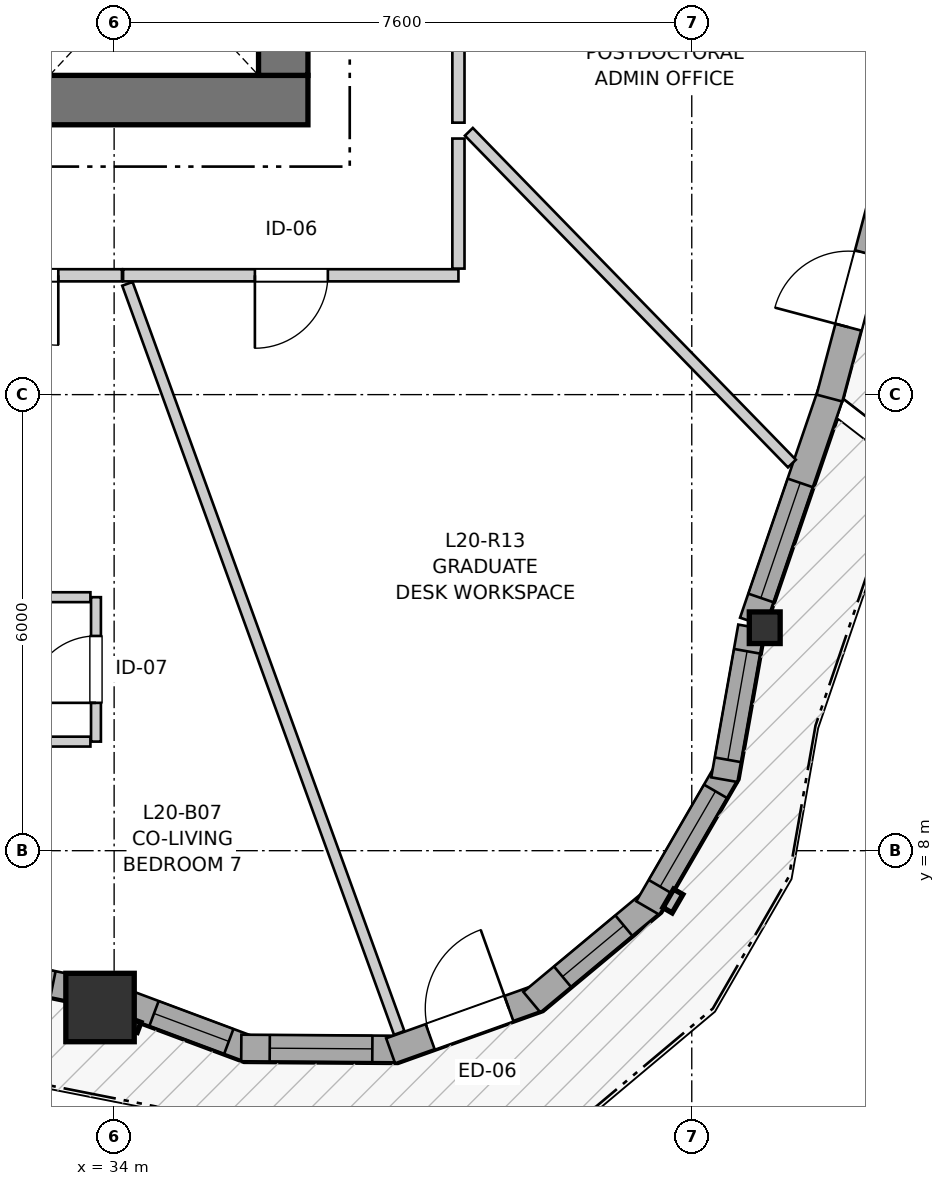
"""IFC4 building model, lengths in metres.
Left out: names, types, materials, properties, quantities, classifications, styles, units other than length and angle.
Written with IfcOpenShell. Run it as: python <this file> out.ifc"""

import sys

from ifc_helpers import new_model, si_unit, direction, frame, frame_2d, origin, origin_2d, place, context, subcontext, project, spatial, rectangle, i_section, extrude, source, transform, mapped, element, fill, save


model = new_model("IFC4")
c1 = context("Model", 3, precision=1e-05, world=origin(), true_north=direction((0.0, 1.0)))
c2 = subcontext(c1, "Body", "Model", "MODEL_VIEW")
j1 = project(units=[si_unit("LENGTHUNIT", "METRE"), si_unit("PLANEANGLEUNIT", "RADIAN")], contexts=[c1])
p1 = place(None, origin())
s1 = spatial("IfcSite", under=j1, at=p1, CompositionType="ELEMENT")
p2 = place(p1, origin())
s2 = spatial("IfcBuilding", under=s1, at=p2, CompositionType="ELEMENT")
p3 = place(p2, frame((0.0, 0.0, 70.4)))
s3 = spatial("IfcBuildingStorey", under=s2, at=p3, CompositionType="ELEMENT", Elevation=70.4)
p4 = place(p3, frame((24.15, 17.875, 0.0), z_axis=(0.0, 0.0, 1.0), x_axis=(1.0, 0.0, 0.0)))
e1 = element("IfcWall", 1, at=p4, inside=s3, PredefinedType="SHEAR", context=c2, shape_type="SweptSolid", body=[
    extrude(rectangle(XDim=12.4, YDim=0.65, at=frame_2d((6.2, 0.0))), origin(), (0.0, 0.0, 1.0), 2.95),
])
p5 = place(p3, frame((36.225, 18.2, 0.0), z_axis=(0.0, 0.0, 1.0), x_axis=(0.0, 1.0, 0.0)))
e2 = element("IfcWall", 2, at=p5, inside=s3, PredefinedType="SHEAR", context=c2, shape_type="SweptSolid", body=[
    extrude(rectangle(XDim=15.6, YDim=0.65, at=frame_2d((7.8, 0.0))), origin(), (0.0, 0.0, 1.0), 2.95),
])
p6 = place(p5, frame((4.25, 0.0, 0.0)))
e3 = element("IfcOpeningElement", 3, at=p6, cuts=e2, PredefinedType="OPENING", context=c2, shape_type="SweptSolid", body=[
    extrude(rectangle(XDim=1.1, YDim=2.15, at=frame_2d((0.55, 1.075))), frame((0.0, 0.335, 0.0), z_axis=(0.0, -1.0, 0.0), x_axis=(1.0, 0.0, 0.0)), (0.0, 0.0, 1.0), 0.67),
])
p7 = place(p5, frame((10.25, 0.0, 0.0)))
e4 = element("IfcOpeningElement", 4, at=p7, cuts=e2, PredefinedType="OPENING", context=c2, shape_type="SweptSolid", body=[
    extrude(rectangle(XDim=1.1, YDim=2.15, at=frame_2d((0.55, 1.075))), frame((0.0, 0.335, 0.0), z_axis=(0.0, -1.0, 0.0), x_axis=(1.0, 0.0, 0.0)), (0.0, 0.0, 1.0), 0.67),
])
m1 = source(origin(), c2, "Body", "SweptSolid", [
    extrude(rectangle(XDim=0.9, YDim=0.9, at=origin_2d()), origin(), (0.0, 0.0, 1.0), 2.95),
])
p8 = place(p3, frame((33.815, 5.937, 0.0), z_axis=(0.0, 0.0, 1.0), x_axis=(1.0, 0.0, 0.0)))
e5 = element("IfcColumn", 5, at=p8, inside=s3, PredefinedType="COLUMN", context=c2, shape_type="MappedRepresentation", body=[
    mapped(m1, transform((0.0, 0.0, 0.0), x_axis=(1.0, 0.0, 0.0), y_axis=(0.0, 1.0, 0.0), z_axis=(0.0, 0.0, 1.0), scale=1.0)),
])
m2 = source(origin(), c2, "Body", "SweptSolid", [
    extrude(i_section(OverallWidth=0.406, OverallDepth=0.416, WebThickness=0.027, FlangeThickness=0.044, FilletRadius=0.015, at=origin_2d()), origin(), (0.0, 0.0, 1.0), 2.95),
])
p9 = place(p3, frame((42.56, 10.933, 0.0), z_axis=(0.0, 0.0, 1.0), x_axis=(1.0, 0.0, 0.0)))
e6 = element("IfcColumn", 6, at=p9, inside=s3, PredefinedType="PILASTER", context=c2, shape_type="MappedRepresentation", body=[
    mapped(m2, transform((0.0, 0.0, 0.0), x_axis=(1.0, 0.0, 0.0), y_axis=(0.0, 1.0, 0.0), z_axis=(0.0, 0.0, 1.0), scale=1.0)),
])
p10 = place(p3, frame((30.741, 6.748, 0.0), z_axis=(0.0, 0.0, 1.0), x_axis=(0.979446941056, -0.201701982282, 0.0)))
e7 = element("IfcWall", 7, at=p10, inside=s3, PredefinedType="SOLIDWALL", context=c2, shape_type="SweptSolid", body=[
    extrude(rectangle(XDim=2.948, YDim=0.35, at=frame_2d((1.474, 0.0))), origin(), (0.0, 0.0, 1.0), 2.48),
])
p11 = place(p10, frame((0.27, 0.0, 0.82)))
e8 = element("IfcOpeningElement", 8, at=p11, cuts=e7, PredefinedType="OPENING", context=c2, shape_type="SweptSolid", body=[
    extrude(rectangle(XDim=1.25, YDim=1.35, at=frame_2d((0.625, 0.675))), frame((0.0, 0.185, 0.0), z_axis=(0.0, -1.0, 0.0), x_axis=(1.0, 0.0, 0.0)), (0.0, 0.0, 1.0), 0.37),
])
p12 = place(p10, frame((1.925, 0.0, 0.82)))
e9 = element("IfcOpeningElement", 9, at=p12, cuts=e7, PredefinedType="OPENING", context=c2, shape_type="SweptSolid", body=[
    extrude(rectangle(XDim=0.58, YDim=1.35, at=frame_2d((0.29, 0.675))), frame((0.0, 0.185, 0.0), z_axis=(0.0, -1.0, 0.0), x_axis=(1.0, 0.0, 0.0)), (0.0, 0.0, 1.0), 0.37),
])
p13 = place(p3, frame((34.087, 6.022, 0.0), z_axis=(0.0, 0.0, 1.0), x_axis=(0.9368310555, -0.349782180007, 0.0)))
e10 = element("IfcWall", 10, at=p13, inside=s3, PredefinedType="SOLIDWALL", context=c2, shape_type="SweptSolid", body=[
    extrude(rectangle(XDim=1.836, YDim=0.35, at=frame_2d((0.918, 0.0))), origin(), (0.0, 0.0, 1.0), 2.48),
])
p14 = place(p13, frame((0.468, 0.0, 0.82)))
e11 = element("IfcOpeningElement", 11, at=p14, cuts=e10, PredefinedType="OPENING", context=c2, shape_type="SweptSolid", body=[
    extrude(rectangle(XDim=1.05, YDim=1.45, at=frame_2d((0.525, 0.725))), frame((0.0, 0.185, 0.0), z_axis=(0.0, -1.0, 0.0), x_axis=(1.0, 0.0, 0.0)), (0.0, 0.0, 1.0), 0.37),
])
p15 = place(p3, frame((35.673, 5.404, 0.0), z_axis=(0.0, 0.0, 1.0), x_axis=(0.999976451414, -0.006862697526, 0.0)))
e12 = element("IfcWall", 12, at=p15, inside=s3, PredefinedType="SOLIDWALL", context=c2, shape_type="SweptSolid", body=[
    extrude(rectangle(XDim=2.099, YDim=0.35, at=frame_2d((1.049, 0.0))), origin(), (0.0, 0.0, 1.0), 2.48),
])
p16 = place(p15, frame((0.375, 0.0, 0.82)))
e13 = element("IfcOpeningElement", 13, at=p16, cuts=e12, PredefinedType="OPENING", context=c2, shape_type="SweptSolid", body=[
    extrude(rectangle(XDim=1.35, YDim=1.45, at=frame_2d((0.675, 0.725))), frame((0.0, 0.185, 0.0), z_axis=(0.0, -1.0, 0.0), x_axis=(1.0, 0.0, 0.0)), (0.0, 0.0, 1.0), 0.37),
])
p17 = place(p3, frame((37.638, 5.367, 0.0), z_axis=(0.0, 0.0, 1.0), x_axis=(0.941486401639, 0.33705096874, 0.0)))
e14 = element("IfcWall", 14, at=p17, inside=s3, PredefinedType="SOLIDWALL", context=c2, shape_type="SweptSolid", body=[
    extrude(rectangle(XDim=2.099, YDim=0.35, at=frame_2d((1.05, 0.0))), origin(), (0.0, 0.0, 1.0), 2.48),
])
p18 = place(p17, frame((0.552, 0.0, 0.0)))
e15 = element("IfcOpeningElement", 15, at=p18, cuts=e14, PredefinedType="OPENING", context=c2, shape_type="SweptSolid", body=[
    extrude(rectangle(XDim=1.1, YDim=2.1, at=frame_2d((0.55, 1.05))), frame((0.0, 0.185, 0.0), z_axis=(0.0, -1.0, 0.0), x_axis=(1.0, 0.0, 0.0)), (0.0, 0.0, 1.0), 0.37),
])
p19 = place(p3, frame((39.496, 6.007, 0.0), z_axis=(0.0, 0.0, 1.0), x_axis=(0.768450068703, 0.639909752942, 0.0)))
e16 = element("IfcWall", 16, at=p19, inside=s3, PredefinedType="SOLIDWALL", context=c2, shape_type="SweptSolid", body=[
    extrude(rectangle(XDim=2.099, YDim=0.35, at=frame_2d((1.049, 0.0))), origin(), (0.0, 0.0, 1.0), 2.48),
])
p20 = place(p19, frame((0.524, 0.0, 0.82)))
e17 = element("IfcOpeningElement", 17, at=p20, cuts=e16, PredefinedType="OPENING", context=c2, shape_type="SweptSolid", body=[
    extrude(rectangle(XDim=1.05, YDim=1.45, at=frame_2d((0.525, 0.725))), frame((0.0, 0.185, 0.0), z_axis=(0.0, -1.0, 0.0), x_axis=(1.0, 0.0, 0.0)), (0.0, 0.0, 1.0), 0.37),
])
p21 = place(p3, frame((41.021, 7.247, 0.0), z_axis=(0.0, 0.0, 1.0), x_axis=(0.501902596059, 0.864924149315, 0.0)))
e18 = element("IfcWall", 18, at=p21, inside=s3, PredefinedType="SOLIDWALL", context=c2, shape_type="SweptSolid", body=[
    extrude(rectangle(XDim=2.099, YDim=0.35, at=frame_2d((1.049, 0.0))), origin(), (0.0, 0.0, 1.0), 2.48),
])
p22 = place(p21, frame((0.324, 0.0, 0.82)))
e19 = element("IfcOpeningElement", 19, at=p22, cuts=e18, PredefinedType="OPENING", context=c2, shape_type="SweptSolid", body=[
    extrude(rectangle(XDim=1.45, YDim=1.25, at=frame_2d((0.725, 0.625))), frame((0.0, 0.185, 0.0), z_axis=(0.0, -1.0, 0.0), x_axis=(1.0, 0.0, 0.0)), (0.0, 0.0, 1.0), 0.37),
])
p23 = place(p3, frame((42.028, 8.934, 0.0), z_axis=(0.0, 0.0, 1.0), x_axis=(0.174399433509, 0.984674990843, 0.0)))
e20 = element("IfcWall", 20, at=p23, inside=s3, PredefinedType="SOLIDWALL", context=c2, shape_type="SweptSolid", body=[
    extrude(rectangle(XDim=2.041, YDim=0.35, at=frame_2d((1.021, 0.0))), origin(), (0.0, 0.0, 1.0), 2.48),
])
p24 = place(p23, frame((0.265, 0.0, 0.82)))
e21 = element("IfcOpeningElement", 21, at=p24, cuts=e20, PredefinedType="OPENING", context=c2, shape_type="SweptSolid", body=[
    extrude(rectangle(XDim=1.45, YDim=1.25, at=frame_2d((0.725, 0.625))), frame((0.0, 0.185, 0.0), z_axis=(0.0, -1.0, 0.0), x_axis=(1.0, 0.0, 0.0)), (0.0, 0.0, 1.0), 0.37),
])
p25 = place(p3, frame((42.401, 11.009, 0.0), z_axis=(0.0, 0.0, 1.0), x_axis=(0.323605065536, 0.946192243447, 0.0)))
e22 = element("IfcWall", 22, at=p25, inside=s3, PredefinedType="SOLIDWALL", context=c2, shape_type="SweptSolid", body=[
    extrude(rectangle(XDim=3.203, YDim=0.35, at=frame_2d((1.601, 0.0))), origin(), (0.0, 0.0, 1.0), 2.48),
])
p26 = place(p25, frame((0.334, 0.0, 0.82)))
e23 = element("IfcOpeningElement", 23, at=p26, cuts=e22, PredefinedType="OPENING", context=c2, shape_type="SweptSolid", body=[
    extrude(rectangle(XDim=1.6, YDim=1.35, at=frame_2d((0.8, 0.675))), frame((0.0, 0.185, 0.0), z_axis=(0.0, -1.0, 0.0), x_axis=(1.0, 0.0, 0.0)), (0.0, 0.0, 1.0), 0.37),
])
p27 = place(p3, frame((43.412, 13.955, 0.0), z_axis=(0.0, 0.0, 1.0), x_axis=(0.257050841376, 0.966397881283, 0.0)))
e24 = element("IfcWall", 24, at=p27, inside=s3, PredefinedType="SOLIDWALL", context=c2, shape_type="SweptSolid", body=[
    extrude(rectangle(XDim=2.931, YDim=0.35, at=frame_2d((1.465, 0.0))), origin(), (0.0, 0.0, 1.0), 2.48),
])
p28 = place(p27, frame((0.966, 0.0, 0.0)))
e25 = element("IfcOpeningElement", 25, at=p28, cuts=e24, PredefinedType="OPENING", context=c2, shape_type="SweptSolid", body=[
    extrude(rectangle(XDim=1.0, YDim=2.1, at=frame_2d((0.5, 1.05))), frame((0.0, 0.185, 0.0), z_axis=(0.0, -1.0, 0.0), x_axis=(1.0, 0.0, 0.0)), (0.0, 0.0, 1.0), 0.37),
])
p29 = place(p3, frame((38.53, 24.781, 0.0), z_axis=(0.0, 0.0, 1.0), x_axis=(0.0, -1.0, 0.0)))
e26 = element("IfcWall", 26, at=p29, inside=s3, PredefinedType="PARTITIONING", context=c2, shape_type="SweptSolid", body=[
    extrude(rectangle(XDim=7.203, YDim=0.16, at=frame_2d((3.602, 0.0))), origin(), (0.0, 0.0, 1.0), 2.95),
])
p30 = place(p29, frame((3.119, 0.0, 0.0)))
e27 = element("IfcOpeningElement", 27, at=p30, cuts=e26, PredefinedType="OPENING", context=c2, shape_type="SweptSolid", body=[
    extrude(rectangle(XDim=0.96, YDim=2.1, at=frame_2d((0.48, 1.05))), frame((0.0, 0.09, 0.0), z_axis=(0.0, -1.0, 0.0), x_axis=(1.0, 0.0, 0.0)), (0.0, 0.0, 1.0), 0.18),
])
p31 = place(p3, frame((38.53, 15.57, 0.0), z_axis=(0.0, 0.0, 1.0), x_axis=(-1.0, 0.0, 0.0)))
e28 = element("IfcWall", 28, at=p31, inside=s3, PredefinedType="PARTITIONING", context=c2, shape_type="SweptSolid", body=[
    extrude(rectangle(XDim=4.412, YDim=0.16, at=frame_2d((2.206, 0.0))), origin(), (0.0, 0.0, 1.0), 2.95),
])
p32 = place(p31, frame((1.718, 0.0, 0.0)))
e29 = element("IfcOpeningElement", 29, at=p32, cuts=e28, PredefinedType="OPENING", context=c2, shape_type="SweptSolid", body=[
    extrude(rectangle(XDim=0.96, YDim=2.1, at=frame_2d((0.48, 1.05))), frame((0.0, 0.09, 0.0), z_axis=(0.0, -1.0, 0.0), x_axis=(1.0, 0.0, 0.0)), (0.0, 0.0, 1.0), 0.18),
])
p33 = place(p3, frame((34.103, 15.57, 0.0), z_axis=(0.0, 0.0, 1.0), x_axis=(-1.0, 0.0, 0.0)))
e30 = element("IfcWall", 30, at=p33, inside=s3, PredefinedType="PARTITIONING", context=c2, shape_type="SweptSolid", body=[
    extrude(rectangle(XDim=2.596, YDim=0.16, at=frame_2d((1.298, 0.0))), origin(), (0.0, 0.0, 1.0), 2.95),
])
p34 = place(p33, frame((0.837, 0.0, 0.0)))
e31 = element("IfcOpeningElement", 31, at=p34, cuts=e30, PredefinedType="OPENING", context=c2, shape_type="SweptSolid", body=[
    extrude(rectangle(XDim=0.92, YDim=2.1, at=frame_2d((0.46, 1.05))), frame((0.0, 0.09, 0.0), z_axis=(0.0, -1.0, 0.0), x_axis=(1.0, 0.0, 0.0)), (0.0, 0.0, 1.0), 0.18),
])
p35 = place(p3, frame((33.761, 9.435, 0.0), z_axis=(0.0, 0.0, 1.0), x_axis=(0.0, 1.0, 0.0)))
e32 = element("IfcWall", 32, at=p35, inside=s3, PredefinedType="PARTITIONING", context=c2, shape_type="SweptSolid", body=[
    extrude(rectangle(XDim=1.9, YDim=0.13, at=frame_2d((0.95, 0.0))), origin(), (0.0, 0.0, 1.0), 2.95),
])
p36 = place(p35, frame((0.51, 0.0, 0.0)))
e33 = element("IfcOpeningElement", 33, at=p36, cuts=e32, PredefinedType="OPENING", context=c2, shape_type="SweptSolid", body=[
    extrude(rectangle(XDim=0.88, YDim=2.05, at=frame_2d((0.44, 1.025))), frame((0.0, 0.075, 0.0), z_axis=(0.0, -1.0, 0.0), x_axis=(1.0, 0.0, 0.0)), (0.0, 0.0, 1.0), 0.15),
])
p37 = place(p3, frame((34.175, 15.458, 0.0), z_axis=(0.0, 0.0, 1.0), x_axis=(0.341079223998, -0.940034554129, 0.0)))
e34 = element("IfcWall", 34, at=p37, inside=s3, PredefinedType="PARTITIONING", context=c2, shape_type="SweptSolid", body=[
    extrude(rectangle(XDim=10.484, YDim=0.145, at=frame_2d((5.242, 0.0))), origin(), (0.0, 0.0, 1.0), 2.95),
])
p38 = place(p3, frame((38.667, 17.458, 0.0), z_axis=(0.0, 0.0, 1.0), x_axis=(0.697626427609, -0.716461699954, 0.0)))
e35 = element("IfcWall", 35, at=p38, inside=s3, PredefinedType="PARTITIONING", context=c2, shape_type="SweptSolid", body=[
    extrude(rectangle(XDim=6.092, YDim=0.145, at=frame_2d((3.046, 0.0))), origin(), (0.0, 0.0, 1.0), 2.95),
])
p39 = place(p3, frame((38.53, 15.658, 0.0), z_axis=(0.0, 0.0, 1.0), x_axis=(0.0, 1.0, 0.0)))
e36 = element("IfcWall", 36, at=p39, inside=s3, PredefinedType="PARTITIONING", context=c2, shape_type="SweptSolid", body=[
    extrude(rectangle(XDim=1.711, YDim=0.16, at=frame_2d((0.855, 0.0))), origin(), (0.0, 0.0, 1.0), 2.95),
])
p40 = place(p3, frame((32.049, 11.335, 0.0), z_axis=(0.0, 0.0, 1.0), x_axis=(1.0, 0.0, 0.0)))
e37 = element("IfcWall", 37, at=p40, inside=s3, PredefinedType="PARTITIONING", context=c2, shape_type="SweptSolid", body=[
    extrude(rectangle(XDim=1.639, YDim=0.13, at=frame_2d((0.82, 0.0))), origin(), (0.0, 0.0, 1.0), 2.95),
])
p41 = place(p3, frame((32.228, 9.435, 0.0), z_axis=(0.0, 0.0, 1.0), x_axis=(1.0, 0.0, 0.0)))
e38 = element("IfcWall", 38, at=p41, inside=s3, PredefinedType="PARTITIONING", context=c2, shape_type="SweptSolid", body=[
    extrude(rectangle(XDim=1.46, YDim=0.13, at=frame_2d((0.73, 0.0))), origin(), (0.0, 0.0, 1.0), 2.95),
])
m3 = source(origin(), c2, "Body", "SweptSolid", [
    extrude(rectangle(XDim=0.58, YDim=1.35, at=frame_2d((0.29, 0.675))), frame((0.0, 0.03, 0.0), z_axis=(0.0, -1.0, 0.0), x_axis=(1.0, 0.0, 0.0)), (0.0, 0.0, 1.0), 0.06),
])
p42 = place(p12, origin())
e39 = element("IfcWindow", 39, at=p42, inside=s3, PartitioningType="SINGLE_PANEL", PredefinedType="WINDOW", context=c2, shape_type="MappedRepresentation", body=[
    mapped(m3, transform((0.0, 0.0, 0.0), x_axis=(1.0, 0.0, 0.0), y_axis=(0.0, 1.0, 0.0), z_axis=(0.0, 0.0, 1.0), scale=1.0)),
])
fill(e9, e39)
m4 = source(origin(), c2, "Body", "SweptSolid", [
    extrude(rectangle(XDim=1.05, YDim=1.45, at=frame_2d((0.525, 0.725))), frame((0.0, 0.03, 0.0), z_axis=(0.0, -1.0, 0.0), x_axis=(1.0, 0.0, 0.0)), (0.0, 0.0, 1.0), 0.06),
])
p43 = place(p14, origin())
e40 = element("IfcWindow", 40, at=p43, inside=s3, PartitioningType="SINGLE_PANEL", PredefinedType="WINDOW", context=c2, shape_type="MappedRepresentation", body=[
    mapped(m4, transform((0.0, 0.0, 0.0), x_axis=(1.0, 0.0, 0.0), y_axis=(0.0, 1.0, 0.0), z_axis=(0.0, 0.0, 1.0), scale=1.0)),
])
fill(e11, e40)
m5 = source(origin(), c2, "Body", "SweptSolid", [
    extrude(rectangle(XDim=1.35, YDim=1.45, at=frame_2d((0.675, 0.725))), frame((0.0, 0.03, 0.0), z_axis=(0.0, -1.0, 0.0), x_axis=(1.0, 0.0, 0.0)), (0.0, 0.0, 1.0), 0.06),
])
p44 = place(p16, origin())
e41 = element("IfcWindow", 41, at=p44, inside=s3, PartitioningType="SINGLE_PANEL", PredefinedType="WINDOW", context=c2, shape_type="MappedRepresentation", body=[
    mapped(m5, transform((0.0, 0.0, 0.0), x_axis=(1.0, 0.0, 0.0), y_axis=(0.0, 1.0, 0.0), z_axis=(0.0, 0.0, 1.0), scale=1.0)),
])
fill(e13, e41)
m6 = source(origin(), c2, "Body", "SweptSolid", [
    extrude(rectangle(XDim=1.1, YDim=2.1, at=frame_2d((0.55, 1.05))), frame((0.0, 0.025, 0.0), z_axis=(0.0, -1.0, 0.0), x_axis=(1.0, 0.0, 0.0)), (0.0, 0.0, 1.0), 0.05),
])
p45 = place(p18, origin())
e42 = element("IfcDoor", 42, at=p45, inside=s3, OperationType="SINGLE_SWING_RIGHT", PredefinedType="DOOR", context=c2, shape_type="MappedRepresentation", body=[
    mapped(m6, transform((0.0, 0.0, 0.0), x_axis=(1.0, 0.0, 0.0), y_axis=(0.0, 1.0, 0.0), z_axis=(0.0, 0.0, 1.0), scale=1.0)),
])
fill(e15, e42)
p46 = place(p20, origin())
e43 = element("IfcWindow", 43, at=p46, inside=s3, PartitioningType="SINGLE_PANEL", PredefinedType="WINDOW", context=c2, shape_type="MappedRepresentation", body=[
    mapped(m4, transform((0.0, 0.0, 0.0), x_axis=(1.0, 0.0, 0.0), y_axis=(0.0, 1.0, 0.0), z_axis=(0.0, 0.0, 1.0), scale=1.0)),
])
fill(e17, e43)
m7 = source(origin(), c2, "Body", "SweptSolid", [
    extrude(rectangle(XDim=1.45, YDim=1.25, at=frame_2d((0.725, 0.625))), frame((0.0, 0.03, 0.0), z_axis=(0.0, -1.0, 0.0), x_axis=(1.0, 0.0, 0.0)), (0.0, 0.0, 1.0), 0.06),
])
p47 = place(p22, origin())
e44 = element("IfcWindow", 44, at=p47, inside=s3, PartitioningType="SINGLE_PANEL", PredefinedType="WINDOW", context=c2, shape_type="MappedRepresentation", body=[
    mapped(m7, transform((0.0, 0.0, 0.0), x_axis=(1.0, 0.0, 0.0), y_axis=(0.0, 1.0, 0.0), z_axis=(0.0, 0.0, 1.0), scale=1.0)),
])
fill(e19, e44)
p48 = place(p24, origin())
e45 = element("IfcWindow", 45, at=p48, inside=s3, PartitioningType="SINGLE_PANEL", PredefinedType="WINDOW", context=c2, shape_type="MappedRepresentation", body=[
    mapped(m7, transform((0.0, 0.0, 0.0), x_axis=(1.0, 0.0, 0.0), y_axis=(0.0, 1.0, 0.0), z_axis=(0.0, 0.0, 1.0), scale=1.0)),
])
fill(e21, e45)
m8 = source(origin(), c2, "Body", "SweptSolid", [
    extrude(rectangle(XDim=1.6, YDim=1.35, at=frame_2d((0.8, 0.675))), frame((0.0, 0.03, 0.0), z_axis=(0.0, -1.0, 0.0), x_axis=(1.0, 0.0, 0.0)), (0.0, 0.0, 1.0), 0.06),
])
p49 = place(p26, origin())
e46 = element("IfcWindow", 46, at=p49, inside=s3, PartitioningType="SINGLE_PANEL", PredefinedType="WINDOW", context=c2, shape_type="MappedRepresentation", body=[
    mapped(m8, transform((0.0, 0.0, 0.0), x_axis=(1.0, 0.0, 0.0), y_axis=(0.0, 1.0, 0.0), z_axis=(0.0, 0.0, 1.0), scale=1.0)),
])
fill(e23, e46)
m9 = source(origin(), c2, "Body", "SweptSolid", [
    extrude(rectangle(XDim=1.0, YDim=2.1, at=frame_2d((0.5, 1.05))), frame((0.0, 0.025, 0.0), z_axis=(0.0, -1.0, 0.0), x_axis=(1.0, 0.0, 0.0)), (0.0, 0.0, 1.0), 0.05),
])
p50 = place(p28, origin())
e47 = element("IfcDoor", 47, at=p50, inside=s3, OperationType="SINGLE_SWING_LEFT", PredefinedType="DOOR", context=c2, shape_type="MappedRepresentation", body=[
    mapped(m9, transform((0.0, 0.0, 0.0), x_axis=(1.0, 0.0, 0.0), y_axis=(0.0, 1.0, 0.0), z_axis=(0.0, 0.0, 1.0), scale=1.0)),
])
fill(e25, e47)
m10 = source(origin(), c2, "Body", "SweptSolid", [
    extrude(rectangle(XDim=0.96, YDim=2.1, at=frame_2d((0.48, 1.05))), frame((0.0, 0.025, 0.0), z_axis=(0.0, -1.0, 0.0), x_axis=(1.0, 0.0, 0.0)), (0.0, 0.0, 1.0), 0.05),
])
p51 = place(p32, origin())
e48 = element("IfcDoor", 48, at=p51, inside=s3, OperationType="SINGLE_SWING_RIGHT", PredefinedType="DOOR", context=c2, shape_type="MappedRepresentation", body=[
    mapped(m10, transform((0.0, 0.0, 0.0), x_axis=(1.0, 0.0, 0.0), y_axis=(0.0, 1.0, 0.0), z_axis=(0.0, 0.0, 1.0), scale=1.0)),
])
fill(e29, e48)
m11 = source(origin(), c2, "Body", "SweptSolid", [
    extrude(rectangle(XDim=0.92, YDim=2.1, at=frame_2d((0.46, 1.05))), frame((0.0, 0.025, 0.0), z_axis=(0.0, -1.0, 0.0), x_axis=(1.0, 0.0, 0.0)), (0.0, 0.0, 1.0), 0.05),
])
p52 = place(p34, origin())
e49 = element("IfcDoor", 49, at=p52, inside=s3, OperationType="SINGLE_SWING_LEFT", PredefinedType="DOOR", context=c2, shape_type="MappedRepresentation", body=[
    mapped(m11, transform((0.0, 0.0, 0.0), x_axis=(1.0, 0.0, 0.0), y_axis=(0.0, 1.0, 0.0), z_axis=(0.0, 0.0, 1.0), scale=1.0)),
])
fill(e31, e49)
m12 = source(origin(), c2, "Body", "SweptSolid", [
    extrude(rectangle(XDim=0.88, YDim=2.05, at=frame_2d((0.44, 1.025))), frame((0.0, 0.025, 0.0), z_axis=(0.0, -1.0, 0.0), x_axis=(1.0, 0.0, 0.0)), (0.0, 0.0, 1.0), 0.05),
])
p53 = place(p36, origin())
e50 = element("IfcDoor", 50, at=p53, inside=s3, OperationType="SINGLE_SWING_LEFT", PredefinedType="DOOR", context=c2, shape_type="MappedRepresentation", body=[
    mapped(m12, transform((0.0, 0.0, 0.0), x_axis=(1.0, 0.0, 0.0), y_axis=(0.0, 1.0, 0.0), z_axis=(0.0, 0.0, 1.0), scale=1.0)),
])
fill(e33, e50)
save(model, sys.argv[1])
